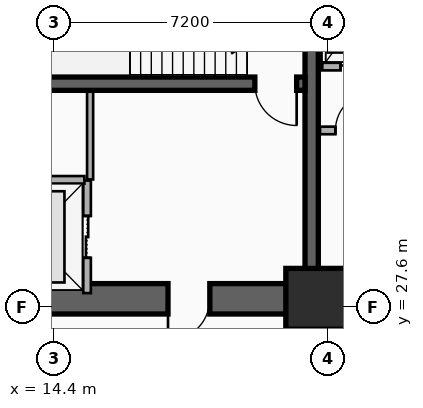
"""IFC4 building model, lengths in metres.
Left out: names, types, materials, properties, quantities, classifications, styles, units other than length and angle.
Written with IfcOpenShell. Run it as: python <this file> out.ifc"""

import sys

from ifc_helpers import new_model, si_unit, direction, frame, frame_2d, origin, origin_2d, place, context, subcontext, project, spatial, rectangle, extrude, element, fill, save


model = new_model("IFC4")
c1 = context("Model", 3, precision=1e-05, world=origin(), true_north=direction((0.0, 1.0)))
c2 = subcontext(c1, "Body", "Model", "MODEL_VIEW")
j1 = project(units=[si_unit("LENGTHUNIT", "METRE"), si_unit("PLANEANGLEUNIT", "RADIAN")], contexts=[c1])
p1 = place(None, origin())
s1 = spatial("IfcSite", under=j1, at=p1, CompositionType="ELEMENT")
p2 = place(p1, origin())
s2 = spatial("IfcBuilding", under=s1, at=p2, CompositionType="ELEMENT")
p3 = place(p2, frame((0.0, 0.0, 10.4)))
s3 = spatial("IfcBuildingStorey", under=s2, at=p3, CompositionType="ELEMENT", Elevation=10.4)
p4 = place(p3, frame((21.18, 27.82, 0.0), z_axis=(0.0, 0.0, 1.0), x_axis=(-1.0, 0.0, 0.0)))
e1 = element("IfcWall", 1, at=p4, inside=s3, PredefinedType="SHEAR", context=c2, shape_type="SweptSolid", body=[
    extrude(rectangle(XDim=9.03, YDim=0.8, at=frame_2d((4.515, 0.0))), origin(), (0.0, 0.0, 1.0), 4.5),
])
p5 = place(p4, frame((2.68, 0.0, 0.0)))
e2 = element("IfcOpeningElement", 2, at=p5, cuts=e1, PredefinedType="OPENING", context=c2, shape_type="SweptSolid", body=[
    extrude(rectangle(XDim=1.1, YDim=2.15, at=frame_2d((0.55, 1.075))), frame((0.0, 0.41, 0.0), z_axis=(0.0, -1.0, 0.0), x_axis=(1.0, 0.0, 0.0)), (0.0, 0.0, 1.0), 0.82),
])
p6 = place(p3, frame((33.15, 27.82, 0.0), z_axis=(0.0, 0.0, 1.0), x_axis=(-1.0, 0.0, 0.0)))
e3 = element("IfcWall", 3, at=p6, inside=s3, PredefinedType="SHEAR", context=c2, shape_type="SweptSolid", body=[
    extrude(rectangle(XDim=11.97, YDim=0.8, at=frame_2d((5.985, 0.0))), origin(), (0.0, 0.0, 1.0), 4.5),
])
p7 = place(p6, frame((6.1, 0.0, 0.0)))
e4 = element("IfcOpeningElement", 4, at=p7, cuts=e3, PredefinedType="OPENING", context=c2, shape_type="SweptSolid", body=[
    extrude(rectangle(XDim=1.6, YDim=2.2, at=frame_2d((0.8, 1.1))), frame((0.0, 0.41, 0.0), z_axis=(0.0, -1.0, 0.0), x_axis=(1.0, 0.0, 0.0)), (0.0, 0.0, 1.0), 0.82),
])
p8 = place(p3, frame((21.18, 28.22, 0.0), z_axis=(0.0, 0.0, 1.0), x_axis=(0.0, 1.0, 0.0)))
e5 = element("IfcWall", 5, at=p8, inside=s3, PredefinedType="SHEAR", context=c2, shape_type="SweptSolid", body=[
    extrude(rectangle(XDim=8.43, YDim=0.35, at=frame_2d((4.215, 0.0))), origin(), (0.0, 0.0, 1.0), 4.5),
])
p9 = place(p3, frame((21.005, 33.48, 0.0), z_axis=(0.0, 0.0, 1.0), x_axis=(-1.0, 0.0, 0.0)))
e6 = element("IfcWall", 6, at=p9, inside=s3, PredefinedType="SHEAR", context=c2, shape_type="SweptSolid", body=[
    extrude(rectangle(XDim=8.455, YDim=0.35, at=frame_2d((4.228, 0.0))), origin(), (0.0, 0.0, 1.0), 4.5),
])
p10 = place(p9, frame((0.22, 0.0, 0.0)))
e7 = element("IfcOpeningElement", 7, at=p10, cuts=e6, PredefinedType="OPENING", context=c2, shape_type="SweptSolid", body=[
    extrude(rectangle(XDim=1.1, YDim=2.15, at=frame_2d((0.55, 1.075))), frame((0.0, 0.185, 0.0), z_axis=(0.0, -1.0, 0.0), x_axis=(1.0, 0.0, 0.0)), (0.0, 0.0, 1.0), 0.37),
])
p11 = place(p3, frame((21.3, 27.82, 0.0), z_axis=(0.0, 0.0, 1.0), x_axis=(1.0, 0.0, 0.0)))
e8 = element("IfcColumn", 8, at=p11, inside=s3, PredefinedType="COLUMN", context=c2, shape_type="SweptSolid", body=[
    extrude(rectangle(XDim=1.6, YDim=1.6, at=origin_2d()), origin(), (0.0, 0.0, 1.0), 4.5),
])
p12 = place(p3, frame((15.27, 27.97, 0.0), z_axis=(0.0, 0.0, 1.0), x_axis=(0.0, 1.0, 0.0)))
e9 = element("IfcWall", 9, at=p12, inside=s3, PredefinedType="PARTITIONING", context=c2, shape_type="SweptSolid", body=[
    extrude(rectangle(XDim=2.96, YDim=0.2, at=frame_2d((1.48, 0.0))), origin(), (0.0, 0.0, 1.0), 3.172),
])
p13 = place(p12, frame((0.93, 0.0, 0.0)))
e10 = element("IfcOpeningElement", 10, at=p13, cuts=e9, PredefinedType="OPENING", context=c2, shape_type="SweptSolid", body=[
    extrude(rectangle(XDim=1.1, YDim=2.15, at=frame_2d((0.55, 1.075))), frame((0.0, 0.11, 0.0), z_axis=(0.0, -1.0, 0.0), x_axis=(1.0, 0.0, 0.0)), (0.0, 0.0, 1.0), 0.22),
])
p14 = place(p3, frame((12.45, 30.95, 0.0), z_axis=(0.0, 0.0, 1.0), x_axis=(1.0, 0.0, 0.0)))
e11 = element("IfcWall", 11, at=p14, inside=s3, PredefinedType="PARTITIONING", context=c2, shape_type="SweptSolid", body=[
    extrude(rectangle(XDim=2.75, YDim=0.2, at=frame_2d((1.375, 0.0))), origin(), (0.0, 0.0, 1.0), 3.172),
])
p15 = place(p3, frame((21.46, 33.93, 0.0), z_axis=(0.0, 0.0, 1.0), x_axis=(1.0, 0.0, 0.0)))
e12 = element("IfcWall", 12, at=p15, inside=s3, PredefinedType="PARTITIONING", context=c2, shape_type="SweptSolid", body=[
    extrude(rectangle(XDim=2.065, YDim=0.2, at=frame_2d((1.032, 0.0))), origin(), (0.0, 0.0, 1.0), 3.172),
])
p16 = place(p15, frame((0.482, 0.0, 0.0)))
e13 = element("IfcOpeningElement", 13, at=p16, cuts=e12, PredefinedType="OPENING", context=c2, shape_type="SweptSolid", body=[
    extrude(rectangle(XDim=1.1, YDim=2.15, at=frame_2d((0.55, 1.075))), frame((0.0, 0.11, 0.0), z_axis=(0.0, -1.0, 0.0), x_axis=(1.0, 0.0, 0.0)), (0.0, 0.0, 1.0), 0.22),
])
p17 = place(p3, frame((21.4, 32.25, 0.0), z_axis=(0.0, 0.0, 1.0), x_axis=(1.0, 0.0, 0.0)))
e14 = element("IfcWall", 14, at=p17, inside=s3, PredefinedType="PARTITIONING", context=c2, shape_type="SweptSolid", body=[
    extrude(rectangle(XDim=1.81, YDim=0.2, at=frame_2d((0.905, 0.0))), origin(), (0.0, 0.0, 1.0), 3.172),
])
p18 = place(p17, frame((0.405, 0.0, 0.0)))
e15 = element("IfcOpeningElement", 15, at=p18, cuts=e14, PredefinedType="OPENING", context=c2, shape_type="SweptSolid", body=[
    extrude(rectangle(XDim=1.0, YDim=2.15, at=frame_2d((0.5, 1.075))), frame((0.0, 0.11, 0.0), z_axis=(0.0, -1.0, 0.0), x_axis=(1.0, 0.0, 0.0)), (0.0, 0.0, 1.0), 0.22),
])
p19 = place(p3, frame((15.35, 30.96, 0.0), z_axis=(0.0, 0.0, 1.0), x_axis=(0.0, 1.0, 0.0)))
e16 = element("IfcWall", 16, at=p19, inside=s3, PredefinedType="PARTITIONING", context=c2, shape_type="SweptSolid", body=[
    extrude(rectangle(XDim=2.31, YDim=0.16, at=frame_2d((1.155, 0.0))), origin(), (0.0, 0.0, 1.0), 4.2),
])
p20 = place(p13, origin())
e17 = element("IfcDoor", 17, at=p20, inside=s3, OperationType="DOUBLE_DOOR_SLIDING", PredefinedType="DOOR", context=c2, shape_type="SweptSolid", body=[
    extrude(rectangle(XDim=1.1, YDim=2.15, at=frame_2d((0.55, 1.075))), frame((0.0, 0.025, 0.0), z_axis=(0.0, -1.0, 0.0), x_axis=(1.0, 0.0, 0.0)), (0.0, 0.0, 1.0), 0.05),
])
fill(e10, e17)
p21 = place(p16, origin())
e18 = element("IfcDoor", 18, at=p21, inside=s3, OperationType="DOUBLE_DOOR_SLIDING", PredefinedType="DOOR", context=c2, shape_type="SweptSolid", body=[
    extrude(rectangle(XDim=1.1, YDim=2.15, at=frame_2d((0.55, 1.075))), frame((0.0, 0.025, 0.0), z_axis=(0.0, -1.0, 0.0), x_axis=(1.0, 0.0, 0.0)), (0.0, 0.0, 1.0), 0.05),
])
fill(e13, e18)
p22 = place(p10, origin())
e19 = element("IfcDoor", 19, at=p22, inside=s3, OperationType="SINGLE_SWING_LEFT", PredefinedType="DOOR", context=c2, shape_type="SweptSolid", body=[
    extrude(rectangle(XDim=1.1, YDim=2.15, at=frame_2d((0.55, 1.075))), frame((0.0, 0.025, 0.0), z_axis=(0.0, -1.0, 0.0), x_axis=(1.0, 0.0, 0.0)), (0.0, 0.0, 1.0), 0.05),
])
fill(e7, e19)
p23 = place(p5, origin())
e20 = element("IfcDoor", 20, at=p23, inside=s3, OperationType="SINGLE_SWING_RIGHT", PredefinedType="DOOR", context=c2, shape_type="SweptSolid", body=[
    extrude(rectangle(XDim=1.1, YDim=2.15, at=frame_2d((0.55, 1.075))), frame((0.0, 0.025, 0.0), z_axis=(0.0, -1.0, 0.0), x_axis=(1.0, 0.0, 0.0)), (0.0, 0.0, 1.0), 0.05),
])
fill(e2, e20)
p24 = place(p18, origin())
e21 = element("IfcDoor", 21, at=p24, inside=s3, OperationType="SINGLE_SWING_RIGHT", PredefinedType="DOOR", context=c2, shape_type="SweptSolid", body=[
    extrude(rectangle(XDim=1.0, YDim=2.15, at=frame_2d((0.5, 1.075))), frame((0.0, 0.025, 0.0), z_axis=(0.0, -1.0, 0.0), x_axis=(1.0, 0.0, 0.0)), (0.0, 0.0, 1.0), 0.05),
])
fill(e15, e21)
save(model, sys.argv[1])
